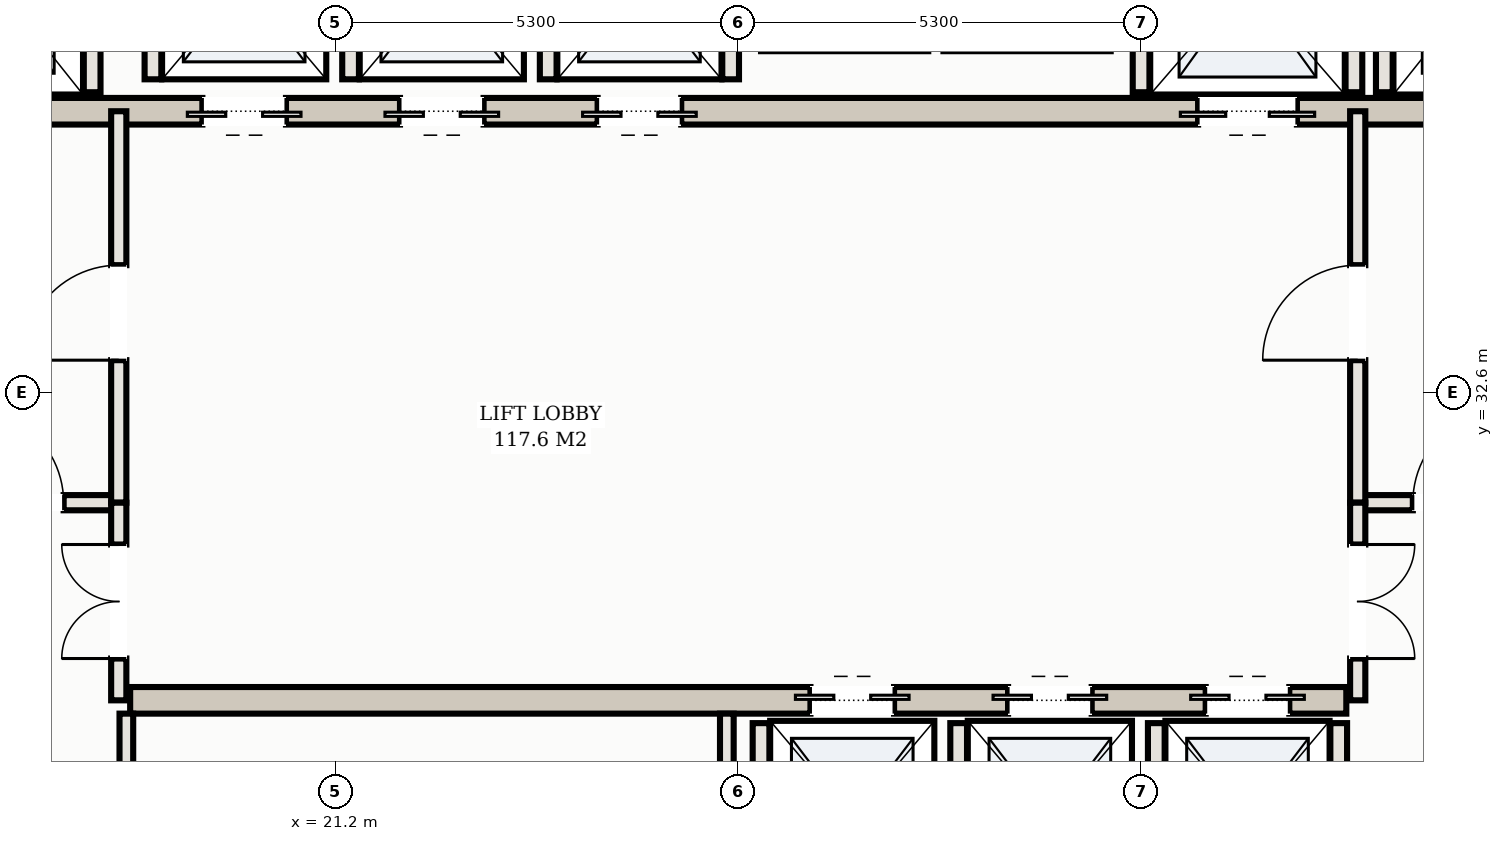
"""IFC4 building model, lengths in metres.
Left out: names, types, materials, properties, quantities, classifications, styles, units other than length and angle.
Written with IfcOpenShell. Run it as: python <this file> out.ifc"""

import sys

from ifc_helpers import new_model, si_unit, direction, frame, frame_2d, origin, place, context, subcontext, project, spatial, rectangle, extrude, element, fill, save


model = new_model("IFC4")
c1 = context("Model", 3, precision=1e-05, world=origin(), true_north=direction((0.0, 1.0)))
c2 = subcontext(c1, "Body", "Model", "MODEL_VIEW")
j1 = project(units=[si_unit("LENGTHUNIT", "METRE"), si_unit("PLANEANGLEUNIT", "RADIAN")], contexts=[c1])
p1 = place(None, origin())
s1 = spatial("IfcSite", under=j1, at=p1, CompositionType="ELEMENT")
p2 = place(p1, origin())
s2 = spatial("IfcBuilding", under=s1, at=p2, CompositionType="ELEMENT")
p3 = place(p2, frame((0.0, 0.0, 192.2)))
s3 = spatial("IfcBuildingStorey", under=s2, at=p3, CompositionType="ELEMENT", Elevation=192.2)
p4 = place(p3, frame((15.5, 36.3, 0.0), z_axis=(0.0, 0.0, 1.0), x_axis=(1.0, 0.0, 0.0)))
e1 = element("IfcWall", 1, at=p4, inside=s3, PredefinedType="SHEAR", context=c2, shape_type="SweptSolid", body=[
    extrude(rectangle(XDim=22.0, YDim=0.35, at=frame_2d((11.0, 0.0))), origin(), (0.0, 0.0, 1.0), 4.31),
])
p5 = place(p4, frame((0.65, 0.0, 0.0)))
e2 = element("IfcOpeningElement", 2, at=p5, cuts=e1, PredefinedType="OPENING", context=c2, shape_type="SweptSolid", body=[
    extrude(rectangle(XDim=1.1, YDim=2.15, at=frame_2d((0.55, 1.075))), frame((0.0, 0.185, 0.0), z_axis=(0.0, -1.0, 0.0), x_axis=(1.0, 0.0, 0.0)), (0.0, 0.0, 1.0), 0.37),
])
p6 = place(p4, frame((20.25, 0.0, 0.0)))
e3 = element("IfcOpeningElement", 3, at=p6, cuts=e1, PredefinedType="OPENING", context=c2, shape_type="SweptSolid", body=[
    extrude(rectangle(XDim=1.1, YDim=2.15, at=frame_2d((0.55, 1.075))), frame((0.0, 0.185, 0.0), z_axis=(0.0, -1.0, 0.0), x_axis=(1.0, 0.0, 0.0)), (0.0, 0.0, 1.0), 0.37),
])
p7 = place(p4, frame((17.05, 0.0, 0.0)))
e4 = element("IfcOpeningElement", 4, at=p7, cuts=e1, PredefinedType="OPENING", context=c2, shape_type="SweptSolid", body=[
    extrude(rectangle(XDim=1.3, YDim=2.2, at=frame_2d((0.65, 1.1))), frame((0.0, 0.185, 0.0), z_axis=(0.0, -1.0, 0.0), x_axis=(1.0, 0.0, 0.0)), (0.0, 0.0, 1.0), 0.37),
])
p8 = place(p4, frame((3.95, 0.0, 0.0)))
e5 = element("IfcOpeningElement", 5, at=p8, cuts=e1, PredefinedType="OPENING", context=c2, shape_type="SweptSolid", body=[
    extrude(rectangle(XDim=1.1, YDim=2.15, at=frame_2d((0.55, 1.075))), frame((0.0, 0.185, 0.0), z_axis=(0.0, -1.0, 0.0), x_axis=(1.0, 0.0, 0.0)), (0.0, 0.0, 1.0), 0.37),
])
p9 = place(p4, frame((6.55, 0.0, 0.0)))
e6 = element("IfcOpeningElement", 6, at=p9, cuts=e1, PredefinedType="OPENING", context=c2, shape_type="SweptSolid", body=[
    extrude(rectangle(XDim=1.1, YDim=2.15, at=frame_2d((0.55, 1.075))), frame((0.0, 0.185, 0.0), z_axis=(0.0, -1.0, 0.0), x_axis=(1.0, 0.0, 0.0)), (0.0, 0.0, 1.0), 0.37),
])
p10 = place(p4, frame((9.15, 0.0, 0.0)))
e7 = element("IfcOpeningElement", 7, at=p10, cuts=e1, PredefinedType="OPENING", context=c2, shape_type="SweptSolid", body=[
    extrude(rectangle(XDim=1.1, YDim=2.15, at=frame_2d((0.55, 1.075))), frame((0.0, 0.185, 0.0), z_axis=(0.0, -1.0, 0.0), x_axis=(1.0, 0.0, 0.0)), (0.0, 0.0, 1.0), 0.37),
])
p11 = place(p3, frame((18.5, 28.55, 0.0), z_axis=(0.0, 0.0, 1.0), x_axis=(1.0, 0.0, 0.0)))
e8 = element("IfcWall", 8, at=p11, inside=s3, PredefinedType="SHEAR", context=c2, shape_type="SweptSolid", body=[
    extrude(rectangle(XDim=16.0, YDim=0.35, at=frame_2d((8.0, 0.0))), origin(), (0.0, 0.0, 1.0), 4.31),
])
p12 = place(p11, frame((8.95, 0.0, 0.0)))
e9 = element("IfcOpeningElement", 9, at=p12, cuts=e8, PredefinedType="OPENING", context=c2, shape_type="SweptSolid", body=[
    extrude(rectangle(XDim=1.1, YDim=2.15, at=frame_2d((0.55, 1.075))), frame((0.0, 0.185, 0.0), z_axis=(0.0, -1.0, 0.0), x_axis=(1.0, 0.0, 0.0)), (0.0, 0.0, 1.0), 0.37),
])
p13 = place(p11, frame((11.55, 0.0, 0.0)))
e10 = element("IfcOpeningElement", 10, at=p13, cuts=e8, PredefinedType="OPENING", context=c2, shape_type="SweptSolid", body=[
    extrude(rectangle(XDim=1.1, YDim=2.15, at=frame_2d((0.55, 1.075))), frame((0.0, 0.185, 0.0), z_axis=(0.0, -1.0, 0.0), x_axis=(1.0, 0.0, 0.0)), (0.0, 0.0, 1.0), 0.37),
])
p14 = place(p11, frame((14.15, 0.0, 0.0)))
e11 = element("IfcOpeningElement", 11, at=p14, cuts=e8, PredefinedType="OPENING", context=c2, shape_type="SweptSolid", body=[
    extrude(rectangle(XDim=1.1, YDim=2.15, at=frame_2d((0.55, 1.075))), frame((0.0, 0.185, 0.0), z_axis=(0.0, -1.0, 0.0), x_axis=(1.0, 0.0, 0.0)), (0.0, 0.0, 1.0), 0.37),
])
for number, where, z_axis, x_axis in (
    (12, (18.0, 36.55, 0.0), (0.0, 0.0, 1.0), (0.0, 1.0, 0.0)),
    (13, (35.0, 36.55, 0.0), (0.0, 0.0, 1.0), (0.0, 1.0, 0.0)),
    (14, (31.8, 36.55, 0.0), (0.0, 0.0, 1.0), (0.0, 1.0, 0.0)),
    (15, (34.6, 36.55, 0.0), (0.0, 0.0, 1.0), (0.0, 1.0, 0.0)),
):
    element("IfcWall", number, at=place(p3, frame(where, z_axis=z_axis, x_axis=x_axis)), inside=s3, PredefinedType="SOLIDWALL", context=c2, shape_type="SweptSolid", body=[
        extrude(rectangle(XDim=2.93, YDim=0.22, at=frame_2d((1.465, 0.0))), origin(), (0.0, 0.0, 1.0), 4.31),
    ])
for number, where, z_axis, x_axis in (
    (16, (26.8, 25.72, 0.0), (0.0, 0.0, 1.0), (0.0, 1.0, 0.0)),
    (17, (29.4, 25.72, 0.0), (0.0, 0.0, 1.0), (0.0, 1.0, 0.0)),
    (18, (32.0, 25.72, 0.0), (0.0, 0.0, 1.0), (0.0, 1.0, 0.0)),
    (19, (34.4, 25.72, 0.0), (0.0, 0.0, 1.0), (0.0, 1.0, 0.0)),
):
    element("IfcWall", number, at=place(p3, frame(where, z_axis=z_axis, x_axis=x_axis)), inside=s3, PredefinedType="SOLIDWALL", context=c2, shape_type="SweptSolid", body=[
        extrude(rectangle(XDim=2.53, YDim=0.22, at=frame_2d((1.265, 0.0))), origin(), (0.0, 0.0, 1.0), 4.31),
    ])
for number, where, z_axis, x_axis in (
    (20, (18.8, 36.72, 0.0), (0.0, 0.0, 1.0), (0.0, 1.0, 0.0)),
    (21, (21.4, 36.72, 0.0), (0.0, 0.0, 1.0), (0.0, 1.0, 0.0)),
    (22, (24.0, 36.72, 0.0), (0.0, 0.0, 1.0), (0.0, 1.0, 0.0)),
    (23, (26.4, 36.72, 0.0), (0.0, 0.0, 1.0), (0.0, 1.0, 0.0)),
):
    element("IfcWall", number, at=place(p3, frame(where, z_axis=z_axis, x_axis=x_axis)), inside=s3, PredefinedType="SOLIDWALL", context=c2, shape_type="SweptSolid", body=[
        extrude(rectangle(XDim=2.56, YDim=0.22, at=frame_2d((1.28, 0.0))), origin(), (0.0, 0.0, 1.0), 4.31),
    ])
p15 = place(p3, frame((15.1, 31.15, 0.0), z_axis=(0.0, 0.0, 1.0), x_axis=(1.0, 0.0, 0.0)))
e24 = element("IfcWall", 24, at=p15, inside=s3, PredefinedType="PARTITIONING", context=c2, shape_type="SweptSolid", body=[
    extrude(rectangle(XDim=3.25, YDim=0.2, at=frame_2d((1.625, 0.0))), origin(), (0.0, 0.0, 1.0), 4.31),
])
p16 = place(p15, frame((1.275, 0.0, 0.0)))
e25 = element("IfcOpeningElement", 25, at=p16, cuts=e24, PredefinedType="OPENING", context=c2, shape_type="SweptSolid", body=[
    extrude(rectangle(XDim=1.25, YDim=2.2, at=frame_2d((0.625, 1.1))), frame((0.0, 0.11, 0.0), z_axis=(0.0, -1.0, 0.0), x_axis=(1.0, 0.0, 0.0)), (0.0, 0.0, 1.0), 0.22),
])
p17 = place(p3, frame((18.35, 31.15, 0.0), z_axis=(0.0, 0.0, 1.0), x_axis=(0.0, 1.0, 0.0)))
e26 = element("IfcWall", 26, at=p17, inside=s3, PredefinedType="PARTITIONING", context=c2, shape_type="SweptSolid", body=[
    extrude(rectangle(XDim=5.15, YDim=0.2, at=frame_2d((2.575, 0.0))), origin(), (0.0, 0.0, 1.0), 4.31),
])
p18 = place(p17, frame((1.875, 0.0, 0.0)))
e27 = element("IfcOpeningElement", 27, at=p18, cuts=e26, PredefinedType="OPENING", context=c2, shape_type="SweptSolid", body=[
    extrude(rectangle(XDim=1.25, YDim=2.2, at=frame_2d((0.625, 1.1))), frame((0.0, 0.11, 0.0), z_axis=(0.0, -1.0, 0.0), x_axis=(1.0, 0.0, 0.0)), (0.0, 0.0, 1.0), 0.22),
])
p19 = place(p3, frame((34.65, 31.15, 0.0), z_axis=(0.0, 0.0, 1.0), x_axis=(1.0, 0.0, 0.0)))
e28 = element("IfcWall", 28, at=p19, inside=s3, PredefinedType="PARTITIONING", context=c2, shape_type="SweptSolid", body=[
    extrude(rectangle(XDim=3.25, YDim=0.2, at=frame_2d((1.625, 0.0))), origin(), (0.0, 0.0, 1.0), 4.31),
])
p20 = place(p19, frame((0.725, 0.0, 0.0)))
e29 = element("IfcOpeningElement", 29, at=p20, cuts=e28, PredefinedType="OPENING", context=c2, shape_type="SweptSolid", body=[
    extrude(rectangle(XDim=1.25, YDim=2.2, at=frame_2d((0.625, 1.1))), frame((0.0, 0.11, 0.0), z_axis=(0.0, -1.0, 0.0), x_axis=(1.0, 0.0, 0.0)), (0.0, 0.0, 1.0), 0.22),
])
p21 = place(p3, frame((34.65, 31.15, 0.0), z_axis=(0.0, 0.0, 1.0), x_axis=(0.0, 1.0, 0.0)))
e30 = element("IfcWall", 30, at=p21, inside=s3, PredefinedType="PARTITIONING", context=c2, shape_type="SweptSolid", body=[
    extrude(rectangle(XDim=5.15, YDim=0.2, at=frame_2d((2.575, 0.0))), origin(), (0.0, 0.0, 1.0), 4.31),
])
p22 = place(p21, frame((1.875, 0.0, 0.0)))
e31 = element("IfcOpeningElement", 31, at=p22, cuts=e30, PredefinedType="OPENING", context=c2, shape_type="SweptSolid", body=[
    extrude(rectangle(XDim=1.25, YDim=2.2, at=frame_2d((0.625, 1.1))), frame((0.0, 0.11, 0.0), z_axis=(0.0, -1.0, 0.0), x_axis=(1.0, 0.0, 0.0)), (0.0, 0.0, 1.0), 0.22),
])
p23 = place(p3, frame((18.35, 28.55, 0.0), z_axis=(0.0, 0.0, 1.0), x_axis=(0.0, 1.0, 0.0)))
e32 = element("IfcWall", 32, at=p23, inside=s3, PredefinedType="PARTITIONING", context=c2, shape_type="SweptSolid", body=[
    extrude(rectangle(XDim=2.6, YDim=0.2, at=frame_2d((1.3, 0.0))), origin(), (0.0, 0.0, 1.0), 4.31),
])
p24 = place(p23, frame((0.55, 0.0, 0.0)))
e33 = element("IfcOpeningElement", 33, at=p24, cuts=e32, PredefinedType="OPENING", context=c2, shape_type="SweptSolid", body=[
    extrude(rectangle(XDim=1.5, YDim=2.25, at=frame_2d((0.75, 1.125))), frame((0.0, 0.11, 0.0), z_axis=(0.0, -1.0, 0.0), x_axis=(1.0, 0.0, 0.0)), (0.0, 0.0, 1.0), 0.22),
])
p25 = place(p3, frame((34.65, 28.55, 0.0), z_axis=(0.0, 0.0, 1.0), x_axis=(0.0, 1.0, 0.0)))
e34 = element("IfcWall", 34, at=p25, inside=s3, PredefinedType="PARTITIONING", context=c2, shape_type="SweptSolid", body=[
    extrude(rectangle(XDim=2.6, YDim=0.2, at=frame_2d((1.3, 0.0))), origin(), (0.0, 0.0, 1.0), 4.31),
])
p26 = place(p25, frame((0.55, 0.0, 0.0)))
e35 = element("IfcOpeningElement", 35, at=p26, cuts=e34, PredefinedType="OPENING", context=c2, shape_type="SweptSolid", body=[
    extrude(rectangle(XDim=1.5, YDim=2.25, at=frame_2d((0.75, 1.125))), frame((0.0, 0.11, 0.0), z_axis=(0.0, -1.0, 0.0), x_axis=(1.0, 0.0, 0.0)), (0.0, 0.0, 1.0), 0.22),
])
for number, where, z_axis, x_axis in (
    (36, (18.45, 25.62, 0.0), (0.0, 0.0, 1.0), (0.0, 1.0, 0.0)),
    (37, (26.35, 25.62, 0.0), (0.0, 0.0, 1.0), (0.0, 1.0, 0.0)),
):
    element("IfcWall", number, at=place(p3, frame(where, z_axis=z_axis, x_axis=x_axis)), inside=s3, PredefinedType="PARTITIONING", context=c2, shape_type="SweptSolid", body=[
        extrude(rectangle(XDim=2.755, YDim=0.18, at=frame_2d((1.377, 0.0))), origin(), (0.0, 0.0, 1.0), 4.31),
    ])
p27 = place(p7, frame((1.3, 0.0, 0.0), z_axis=(0.0, 0.0, 1.0), x_axis=(-1.0, 0.0, 0.0)))
e38 = element("IfcDoor", 38, at=p27, inside=s3, OperationType="DOUBLE_DOOR_SLIDING", PredefinedType="DOOR", context=c2, shape_type="SweptSolid", body=[
    extrude(rectangle(XDim=1.3, YDim=2.2, at=frame_2d((0.65, 1.1))), frame((0.0, 0.025, 0.0), z_axis=(0.0, -1.0, 0.0), x_axis=(1.0, 0.0, 0.0)), (0.0, 0.0, 1.0), 0.05),
])
fill(e4, e38)
p28 = place(p12, origin())
e39 = element("IfcDoor", 39, at=p28, inside=s3, OperationType="DOUBLE_DOOR_SLIDING", PredefinedType="DOOR", context=c2, shape_type="SweptSolid", body=[
    extrude(rectangle(XDim=1.1, YDim=2.15, at=frame_2d((0.55, 1.075))), frame((0.0, 0.025, 0.0), z_axis=(0.0, -1.0, 0.0), x_axis=(1.0, 0.0, 0.0)), (0.0, 0.0, 1.0), 0.05),
])
fill(e9, e39)
p29 = place(p13, origin())
e40 = element("IfcDoor", 40, at=p29, inside=s3, OperationType="DOUBLE_DOOR_SLIDING", PredefinedType="DOOR", context=c2, shape_type="SweptSolid", body=[
    extrude(rectangle(XDim=1.1, YDim=2.15, at=frame_2d((0.55, 1.075))), frame((0.0, 0.025, 0.0), z_axis=(0.0, -1.0, 0.0), x_axis=(1.0, 0.0, 0.0)), (0.0, 0.0, 1.0), 0.05),
])
fill(e10, e40)
p30 = place(p14, origin())
e41 = element("IfcDoor", 41, at=p30, inside=s3, OperationType="DOUBLE_DOOR_SLIDING", PredefinedType="DOOR", context=c2, shape_type="SweptSolid", body=[
    extrude(rectangle(XDim=1.1, YDim=2.15, at=frame_2d((0.55, 1.075))), frame((0.0, 0.025, 0.0), z_axis=(0.0, -1.0, 0.0), x_axis=(1.0, 0.0, 0.0)), (0.0, 0.0, 1.0), 0.05),
])
fill(e11, e41)
p31 = place(p8, frame((1.1, 0.0, 0.0), z_axis=(0.0, 0.0, 1.0), x_axis=(-1.0, 0.0, 0.0)))
e42 = element("IfcDoor", 42, at=p31, inside=s3, OperationType="DOUBLE_DOOR_SLIDING", PredefinedType="DOOR", context=c2, shape_type="SweptSolid", body=[
    extrude(rectangle(XDim=1.1, YDim=2.15, at=frame_2d((0.55, 1.075))), frame((0.0, 0.025, 0.0), z_axis=(0.0, -1.0, 0.0), x_axis=(1.0, 0.0, 0.0)), (0.0, 0.0, 1.0), 0.05),
])
fill(e5, e42)
p32 = place(p9, frame((1.1, 0.0, 0.0), z_axis=(0.0, 0.0, 1.0), x_axis=(-1.0, 0.0, 0.0)))
e43 = element("IfcDoor", 43, at=p32, inside=s3, OperationType="DOUBLE_DOOR_SLIDING", PredefinedType="DOOR", context=c2, shape_type="SweptSolid", body=[
    extrude(rectangle(XDim=1.1, YDim=2.15, at=frame_2d((0.55, 1.075))), frame((0.0, 0.025, 0.0), z_axis=(0.0, -1.0, 0.0), x_axis=(1.0, 0.0, 0.0)), (0.0, 0.0, 1.0), 0.05),
])
fill(e6, e43)
p33 = place(p10, frame((1.1, 0.0, 0.0), z_axis=(0.0, 0.0, 1.0), x_axis=(-1.0, 0.0, 0.0)))
e44 = element("IfcDoor", 44, at=p33, inside=s3, OperationType="DOUBLE_DOOR_SLIDING", PredefinedType="DOOR", context=c2, shape_type="SweptSolid", body=[
    extrude(rectangle(XDim=1.1, YDim=2.15, at=frame_2d((0.55, 1.075))), frame((0.0, 0.025, 0.0), z_axis=(0.0, -1.0, 0.0), x_axis=(1.0, 0.0, 0.0)), (0.0, 0.0, 1.0), 0.05),
])
fill(e7, e44)
p34 = place(p16, origin())
e45 = element("IfcDoor", 45, at=p34, inside=s3, OperationType="SINGLE_SWING_LEFT", PredefinedType="DOOR", context=c2, shape_type="SweptSolid", body=[
    extrude(rectangle(XDim=1.25, YDim=2.2, at=frame_2d((0.625, 1.1))), frame((0.0, 0.025, 0.0), z_axis=(0.0, -1.0, 0.0), x_axis=(1.0, 0.0, 0.0)), (0.0, 0.0, 1.0), 0.05),
])
fill(e25, e45)
p35 = place(p18, origin())
e46 = element("IfcDoor", 46, at=p35, inside=s3, OperationType="SINGLE_SWING_LEFT", PredefinedType="DOOR", context=c2, shape_type="SweptSolid", body=[
    extrude(rectangle(XDim=1.25, YDim=2.2, at=frame_2d((0.625, 1.1))), frame((0.0, 0.025, 0.0), z_axis=(0.0, -1.0, 0.0), x_axis=(1.0, 0.0, 0.0)), (0.0, 0.0, 1.0), 0.05),
])
fill(e27, e46)
p36 = place(p20, origin())
e47 = element("IfcDoor", 47, at=p36, inside=s3, OperationType="SINGLE_SWING_RIGHT", PredefinedType="DOOR", context=c2, shape_type="SweptSolid", body=[
    extrude(rectangle(XDim=1.25, YDim=2.2, at=frame_2d((0.625, 1.1))), frame((0.0, 0.025, 0.0), z_axis=(0.0, -1.0, 0.0), x_axis=(1.0, 0.0, 0.0)), (0.0, 0.0, 1.0), 0.05),
])
fill(e29, e47)
p37 = place(p22, origin())
e48 = element("IfcDoor", 48, at=p37, inside=s3, OperationType="SINGLE_SWING_LEFT", PredefinedType="DOOR", context=c2, shape_type="SweptSolid", body=[
    extrude(rectangle(XDim=1.25, YDim=2.2, at=frame_2d((0.625, 1.1))), frame((0.0, 0.025, 0.0), z_axis=(0.0, -1.0, 0.0), x_axis=(1.0, 0.0, 0.0)), (0.0, 0.0, 1.0), 0.05),
])
fill(e31, e48)
p38 = place(p24, origin())
e49 = element("IfcDoor", 49, at=p38, inside=s3, OperationType="DOUBLE_DOOR_SINGLE_SWING", PredefinedType="DOOR", context=c2, shape_type="SweptSolid", body=[
    extrude(rectangle(XDim=1.5, YDim=2.25, at=frame_2d((0.75, 1.125))), frame((0.0, 0.025, 0.0), z_axis=(0.0, -1.0, 0.0), x_axis=(1.0, 0.0, 0.0)), (0.0, 0.0, 1.0), 0.05),
])
fill(e33, e49)
p39 = place(p26, frame((1.5, 0.0, 0.0), z_axis=(0.0, 0.0, 1.0), x_axis=(-1.0, 0.0, 0.0)))
e50 = element("IfcDoor", 50, at=p39, inside=s3, OperationType="DOUBLE_DOOR_SINGLE_SWING", PredefinedType="DOOR", context=c2, shape_type="SweptSolid", body=[
    extrude(rectangle(XDim=1.5, YDim=2.25, at=frame_2d((0.75, 1.125))), frame((0.0, 0.025, 0.0), z_axis=(0.0, -1.0, 0.0), x_axis=(1.0, 0.0, 0.0)), (0.0, 0.0, 1.0), 0.05),
])
fill(e35, e50)
save(model, sys.argv[1])
